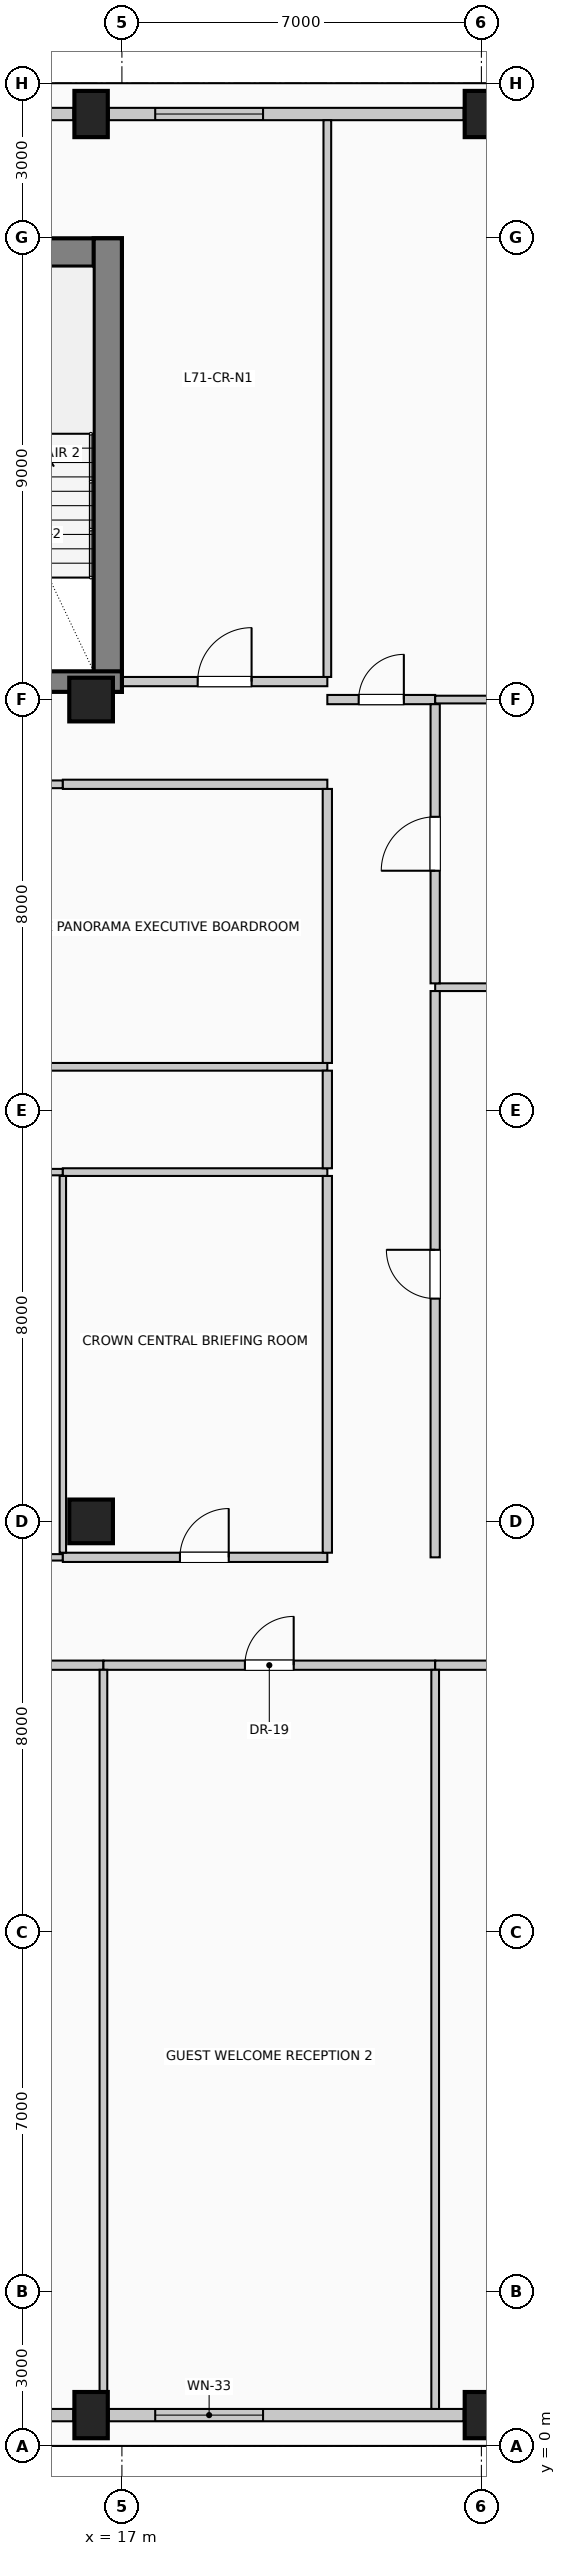
"""IFC4 building model, lengths in metres.
Left out: names, types, materials, properties, quantities, classifications, styles, units other than length and angle.
Written with IfcOpenShell. Run it as: python <this file> out.ifc"""

import sys

from ifc_helpers import new_model, si_unit, direction, frame, frame_2d, origin, origin_2d, place, context, subcontext, project, spatial, rectangle, circle, extrude, element, fill, save


model = new_model("IFC4")
c1 = context("Model", 3, precision=1e-05, world=origin(), true_north=direction((0.0, 1.0)))
c2 = subcontext(c1, "Body", "Model", "MODEL_VIEW")
j1 = project(units=[si_unit("LENGTHUNIT", "METRE"), si_unit("PLANEANGLEUNIT", "RADIAN")], contexts=[c1])
p1 = place(None, origin())
s1 = spatial("IfcSite", under=j1, at=p1, CompositionType="ELEMENT")
p2 = place(p1, origin())
s2 = spatial("IfcBuilding", under=s1, at=p2, CompositionType="ELEMENT")
p3 = place(p2, frame((0.0, 0.0, 293.0)))
s3 = spatial("IfcBuildingStorey", under=s2, at=p3, CompositionType="ELEMENT", Elevation=293.0)
p4 = place(p3, frame((3.0, 42.705, 0.0), z_axis=(0.0, 0.0, 1.0), x_axis=(1.0, 0.0, 0.0)))
e1 = element("IfcWall", 1, at=p4, inside=s3, PredefinedType="SHEAR", context=c2, shape_type="SweptSolid", body=[
    extrude(rectangle(XDim=14.0, YDim=0.55, at=frame_2d((7.0, 0.0))), origin(), (0.0, 0.0, 1.0), 4.0),
])
p5 = place(p3, frame((16.725, 34.15, 0.0), z_axis=(0.0, 0.0, 1.0), x_axis=(0.0, 1.0, 0.0)))
e2 = element("IfcWall", 2, at=p5, inside=s3, PredefinedType="SHEAR", context=c2, shape_type="SweptSolid", body=[
    extrude(rectangle(XDim=8.83, YDim=0.55, at=frame_2d((4.415, 0.0))), origin(), (0.0, 0.0, 1.0), 4.0),
])
p6 = place(p3, frame((12.29, 34.35, 0.0), z_axis=(0.0, 0.0, 1.0), x_axis=(1.0, 0.0, 0.0)))
e3 = element("IfcWall", 3, at=p6, inside=s3, PredefinedType="SHEAR", context=c2, shape_type="SweptSolid", body=[
    extrude(rectangle(XDim=4.71, YDim=0.4, at=frame_2d((2.355, 0.0))), origin(), (0.0, 0.0, 1.0), 4.0),
])
p7 = place(p6, frame((1.4, 0.0, 0.0)))
e4 = element("IfcOpeningElement", 4, at=p7, cuts=e3, PredefinedType="OPENING", context=c2, shape_type="SweptSolid", body=[
    extrude(rectangle(XDim=1.15, YDim=2.2, at=frame_2d((0.575, 1.1))), frame((0.0, 0.21, 0.0), z_axis=(0.0, -1.0, 0.0), x_axis=(1.0, 0.0, 0.0)), (0.0, 0.0, 1.0), 0.42),
])
for number, where, z_axis, x_axis in (
    (5, (16.4, 0.6, 0.0), (0.0, 0.0, 1.0), (1.0, 0.0, 0.0)),
    (6, (16.4, 45.4, 0.0), (0.0, 0.0, 1.0), (1.0, 0.0, 0.0)),
    (7, (24.0, 0.6, 0.0), (0.0, 0.0, 1.0), (1.0, 0.0, 0.0)),
    (8, (24.0, 45.4, 0.0), (0.0, 0.0, 1.0), (1.0, 0.0, 0.0)),
):
    element("IfcColumn", number, at=place(p3, frame(where, z_axis=z_axis, x_axis=x_axis)), inside=s3, PredefinedType="COLUMN", context=c2, shape_type="SweptSolid", body=[
        extrude(rectangle(XDim=0.65, YDim=0.9, at=origin_2d()), origin(), (0.0, 0.0, 1.0), 4.0),
    ])
for number, where, z_axis, x_axis in (
    (9, (16.4, 18.0, 0.0), (0.0, 0.0, 1.0), (1.0, 0.0, 0.0)),
    (10, (16.4, 34.0, 0.0), (0.0, 0.0, 1.0), (1.0, 0.0, 0.0)),
):
    element("IfcColumn", number, at=place(p3, frame(where, z_axis=z_axis, x_axis=x_axis)), inside=s3, PredefinedType="COLUMN", context=c2, shape_type="SweptSolid", body=[
        extrude(circle(Radius=0.425, at=origin_2d()), origin(), (0.0, 0.0, 1.0), 4.0),
    ])
p8 = place(p3, frame((16.055, 0.6, 0.0), z_axis=(0.0, 0.0, 1.0), x_axis=(-1.0, 0.0, 0.0)))
e11 = element("IfcWall", 11, at=p8, inside=s3, PredefinedType="SOLIDWALL", context=c2, shape_type="SweptSolid", body=[
    extrude(rectangle(XDim=1.71, YDim=0.24, at=frame_2d((0.855, 0.0))), origin(), (0.0, 0.0, 1.0), 3.025),
])
p9 = place(p3, frame((23.655, 0.6, 0.0), z_axis=(0.0, 0.0, 1.0), x_axis=(-1.0, 0.0, 0.0)))
e12 = element("IfcWall", 12, at=p9, inside=s3, PredefinedType="SOLIDWALL", context=c2, shape_type="SweptSolid", body=[
    extrude(rectangle(XDim=6.91, YDim=0.24, at=frame_2d((3.455, 0.0))), origin(), (0.0, 0.0, 1.0), 3.025),
])
p10 = place(p9, frame((3.907, 0.0, 0.35)))
e13 = element("IfcOpeningElement", 13, at=p10, cuts=e12, PredefinedType="OPENING", context=c2, shape_type="SweptSolid", body=[
    extrude(rectangle(XDim=2.1, YDim=2.2, at=frame_2d((1.05, 1.1))), frame((0.0, 0.13, 0.0), z_axis=(0.0, -1.0, 0.0), x_axis=(1.0, 0.0, 0.0)), (0.0, 0.0, 1.0), 0.26),
])
p11 = place(p3, frame((14.345, 45.4, 0.0), z_axis=(0.0, 0.0, 1.0), x_axis=(1.0, 0.0, 0.0)))
e14 = element("IfcWall", 14, at=p11, inside=s3, PredefinedType="SOLIDWALL", context=c2, shape_type="SweptSolid", body=[
    extrude(rectangle(XDim=1.71, YDim=0.24, at=frame_2d((0.855, 0.0))), origin(), (0.0, 0.0, 1.0), 3.025),
])
p12 = place(p3, frame((16.745, 45.4, 0.0), z_axis=(0.0, 0.0, 1.0), x_axis=(1.0, 0.0, 0.0)))
e15 = element("IfcWall", 15, at=p12, inside=s3, PredefinedType="SOLIDWALL", context=c2, shape_type="SweptSolid", body=[
    extrude(rectangle(XDim=6.91, YDim=0.24, at=frame_2d((3.455, 0.0))), origin(), (0.0, 0.0, 1.0), 3.025),
])
p13 = place(p12, frame((0.903, 0.0, 0.35)))
e16 = element("IfcOpeningElement", 16, at=p13, cuts=e15, PredefinedType="OPENING", context=c2, shape_type="SweptSolid", body=[
    extrude(rectangle(XDim=2.1, YDim=2.2, at=frame_2d((1.05, 1.1))), frame((0.0, 0.13, 0.0), z_axis=(0.0, -1.0, 0.0), x_axis=(1.0, 0.0, 0.0)), (0.0, 0.0, 1.0), 0.26),
])
p14 = place(p3, frame((8.84, 15.2, 0.0), z_axis=(0.0, 0.0, 1.0), x_axis=(1.0, 0.0, 0.0)))
e17 = element("IfcWall", 17, at=p14, inside=s3, PredefinedType="PARTITIONING", context=c2, shape_type="SweptSolid", body=[
    extrude(rectangle(XDim=7.8, YDim=0.18, at=frame_2d((3.9, 0.0))), origin(), (0.0, 0.0, 1.0), 3.775),
])
p15 = place(p14, frame((3.375, 0.0, 0.0)))
e18 = element("IfcOpeningElement", 18, at=p15, cuts=e17, PredefinedType="OPENING", context=c2, shape_type="SweptSolid", body=[
    extrude(rectangle(XDim=1.05, YDim=2.15, at=frame_2d((0.525, 1.075))), frame((0.0, 0.1, 0.0), z_axis=(0.0, -1.0, 0.0), x_axis=(1.0, 0.0, 0.0)), (0.0, 0.0, 1.0), 0.2),
])
p16 = place(p3, frame((16.64, 15.2, 0.0), z_axis=(0.0, 0.0, 1.0), x_axis=(1.0, 0.0, 0.0)))
e19 = element("IfcWall", 19, at=p16, inside=s3, PredefinedType="PARTITIONING", context=c2, shape_type="SweptSolid", body=[
    extrude(rectangle(XDim=6.46, YDim=0.18, at=frame_2d((3.23, 0.0))), origin(), (0.0, 0.0, 1.0), 3.775),
])
p17 = place(p16, frame((2.755, 0.0, 0.0)))
e20 = element("IfcOpeningElement", 20, at=p17, cuts=e19, PredefinedType="OPENING", context=c2, shape_type="SweptSolid", body=[
    extrude(rectangle(XDim=0.95, YDim=2.15, at=frame_2d((0.475, 1.075))), frame((0.0, 0.1, 0.0), z_axis=(0.0, -1.0, 0.0), x_axis=(1.0, 0.0, 0.0)), (0.0, 0.0, 1.0), 0.2),
])
p18 = place(p3, frame((23.1, 15.2, 0.0), z_axis=(0.0, 0.0, 1.0), x_axis=(1.0, 0.0, 0.0)))
e21 = element("IfcWall", 21, at=p18, inside=s3, PredefinedType="PARTITIONING", context=c2, shape_type="SweptSolid", body=[
    extrude(rectangle(XDim=10.14, YDim=0.18, at=frame_2d((5.07, 0.0))), origin(), (0.0, 0.0, 1.0), 3.775),
])
p19 = place(p18, frame((4.545, 0.0, 0.0)))
e22 = element("IfcOpeningElement", 22, at=p19, cuts=e21, PredefinedType="OPENING", context=c2, shape_type="SweptSolid", body=[
    extrude(rectangle(XDim=1.05, YDim=2.15, at=frame_2d((0.525, 1.075))), frame((0.0, 0.1, 0.0), z_axis=(0.0, -1.0, 0.0), x_axis=(1.0, 0.0, 0.0)), (0.0, 0.0, 1.0), 0.2),
])
p20 = place(p3, frame((9.8, 17.3, 0.0), z_axis=(0.0, 0.0, 1.0), x_axis=(1.0, 0.0, 0.0)))
e23 = element("IfcWall", 23, at=p20, inside=s3, PredefinedType="PARTITIONING", context=c2, shape_type="SweptSolid", body=[
    extrude(rectangle(XDim=6.05, YDim=0.125, at=frame_2d((3.025, 0.0))), origin(), (0.0, 0.0, 1.0), 3.775),
])
p21 = place(p20, frame((2.575, 0.0, 0.0)))
e24 = element("IfcOpeningElement", 24, at=p21, cuts=e23, PredefinedType="OPENING", context=c2, shape_type="SweptSolid", body=[
    extrude(rectangle(XDim=0.9, YDim=2.1, at=frame_2d((0.45, 1.05))), frame((0.0, 0.073, 0.0), z_axis=(0.0, -1.0, 0.0), x_axis=(1.0, 0.0, 0.0)), (0.0, 0.0, 1.0), 0.145),
])
p22 = place(p3, frame((15.85, 17.3, 0.0), z_axis=(0.0, 0.0, 1.0), x_axis=(1.0, 0.0, 0.0)))
e25 = element("IfcWall", 25, at=p22, inside=s3, PredefinedType="PARTITIONING", context=c2, shape_type="SweptSolid", body=[
    extrude(rectangle(XDim=5.15, YDim=0.18, at=frame_2d((2.575, 0.0))), origin(), (0.0, 0.0, 1.0), 3.775),
])
p23 = place(p22, frame((2.28, 0.0, 0.0)))
e26 = element("IfcOpeningElement", 26, at=p23, cuts=e25, PredefinedType="OPENING", context=c2, shape_type="SweptSolid", body=[
    extrude(rectangle(XDim=0.95, YDim=2.15, at=frame_2d((0.475, 1.075))), frame((0.0, 0.1, 0.0), z_axis=(0.0, -1.0, 0.0), x_axis=(1.0, 0.0, 0.0)), (0.0, 0.0, 1.0), 0.2),
])
p24 = place(p3, frame((12.2, 24.8, 0.0), z_axis=(0.0, 0.0, 1.0), x_axis=(1.0, 0.0, 0.0)))
e27 = element("IfcWall", 27, at=p24, inside=s3, PredefinedType="PARTITIONING", context=c2, shape_type="SweptSolid", body=[
    extrude(rectangle(XDim=3.65, YDim=0.125, at=frame_2d((1.825, 0.0))), origin(), (0.0, 0.0, 1.0), 3.775),
])
p25 = place(p3, frame((15.85, 24.8, 0.0), z_axis=(0.0, 0.0, 1.0), x_axis=(1.0, 0.0, 0.0)))
e28 = element("IfcWall", 28, at=p25, inside=s3, PredefinedType="PARTITIONING", context=c2, shape_type="SweptSolid", body=[
    extrude(rectangle(XDim=5.15, YDim=0.15, at=frame_2d((2.575, 0.0))), origin(), (0.0, 0.0, 1.0), 3.775),
])
p26 = place(p3, frame((12.2, 26.85, 0.0), z_axis=(0.0, 0.0, 1.0), x_axis=(1.0, 0.0, 0.0)))
e29 = element("IfcWall", 29, at=p26, inside=s3, PredefinedType="PARTITIONING", context=c2, shape_type="SweptSolid", body=[
    extrude(rectangle(XDim=8.8, YDim=0.15, at=frame_2d((4.4, 0.0))), origin(), (0.0, 0.0, 1.0), 3.775),
])
p27 = place(p3, frame((23.1, 28.4, 0.0), z_axis=(0.0, 0.0, 1.0), x_axis=(1.0, 0.0, 0.0)))
e30 = element("IfcWall", 30, at=p27, inside=s3, PredefinedType="PARTITIONING", context=c2, shape_type="SweptSolid", body=[
    extrude(rectangle(XDim=20.78, YDim=0.15, at=frame_2d((10.39, 0.0))), origin(), (0.0, 0.0, 1.0), 3.775),
])
p28 = place(p3, frame((12.33, 32.35, 0.0), z_axis=(0.0, 0.0, 1.0), x_axis=(1.0, 0.0, 0.0)))
e31 = element("IfcWall", 31, at=p28, inside=s3, PredefinedType="PARTITIONING", context=c2, shape_type="SweptSolid", body=[
    extrude(rectangle(XDim=3.52, YDim=0.15, at=frame_2d((1.76, 0.0))), origin(), (0.0, 0.0, 1.0), 3.775),
])
p29 = place(p28, frame((1.235, 0.0, 0.0)))
e32 = element("IfcOpeningElement", 32, at=p29, cuts=e31, PredefinedType="OPENING", context=c2, shape_type="SweptSolid", body=[
    extrude(rectangle(XDim=1.05, YDim=2.15, at=frame_2d((0.525, 1.075))), frame((0.0, 0.085, 0.0), z_axis=(0.0, -1.0, 0.0), x_axis=(1.0, 0.0, 0.0)), (0.0, 0.0, 1.0), 0.17),
])
p30 = place(p3, frame((15.85, 32.35, 0.0), z_axis=(0.0, 0.0, 1.0), x_axis=(1.0, 0.0, 0.0)))
e33 = element("IfcWall", 33, at=p30, inside=s3, PredefinedType="PARTITIONING", context=c2, shape_type="SweptSolid", body=[
    extrude(rectangle(XDim=5.15, YDim=0.18, at=frame_2d((2.575, 0.0))), origin(), (0.0, 0.0, 1.0), 3.775),
])
p31 = place(p3, frame((21.0, 34.0, 0.0), z_axis=(0.0, 0.0, 1.0), x_axis=(1.0, 0.0, 0.0)))
e34 = element("IfcWall", 34, at=p31, inside=s3, PredefinedType="PARTITIONING", context=c2, shape_type="SweptSolid", body=[
    extrude(rectangle(XDim=2.1, YDim=0.18, at=frame_2d((1.05, 0.0))), origin(), (0.0, 0.0, 1.0), 3.27),
])
p32 = place(p31, frame((0.61, 0.0, 0.0)))
e35 = element("IfcOpeningElement", 35, at=p32, cuts=e34, PredefinedType="OPENING", context=c2, shape_type="SweptSolid", body=[
    extrude(rectangle(XDim=0.88, YDim=2.1, at=frame_2d((0.44, 1.05))), frame((0.0, 0.1, 0.0), z_axis=(0.0, -1.0, 0.0), x_axis=(1.0, 0.0, 0.0)), (0.0, 0.0, 1.0), 0.2),
])
p33 = place(p3, frame((23.1, 34.0, 0.0), z_axis=(0.0, 0.0, 1.0), x_axis=(1.0, 0.0, 0.0)))
e36 = element("IfcWall", 36, at=p33, inside=s3, PredefinedType="PARTITIONING", context=c2, shape_type="SweptSolid", body=[
    extrude(rectangle(XDim=5.475, YDim=0.15, at=frame_2d((2.737, 0.0))), origin(), (0.0, 0.0, 1.0), 3.27),
])
p34 = place(p3, frame((17.0, 34.35, 0.0), z_axis=(0.0, 0.0, 1.0), x_axis=(1.0, 0.0, 0.0)))
e37 = element("IfcWall", 37, at=p34, inside=s3, PredefinedType="PARTITIONING", context=c2, shape_type="SweptSolid", body=[
    extrude(rectangle(XDim=4.0, YDim=0.18, at=frame_2d((2.0, 0.0))), origin(), (0.0, 0.0, 1.0), 3.775),
])
p35 = place(p34, frame((1.475, 0.0, 0.0)))
e38 = element("IfcOpeningElement", 38, at=p35, cuts=e37, PredefinedType="OPENING", context=c2, shape_type="SweptSolid", body=[
    extrude(rectangle(XDim=1.05, YDim=2.15, at=frame_2d((0.525, 1.075))), frame((0.0, 0.1, 0.0), z_axis=(0.0, -1.0, 0.0), x_axis=(1.0, 0.0, 0.0)), (0.0, 0.0, 1.0), 0.2),
])
p36 = place(p3, frame((15.85, 17.39, 0.0), z_axis=(0.0, 0.0, 1.0), x_axis=(0.0, 1.0, 0.0)))
e39 = element("IfcWall", 39, at=p36, inside=s3, PredefinedType="PARTITIONING", context=c2, shape_type="SweptSolid", body=[
    extrude(rectangle(XDim=7.335, YDim=0.125, at=frame_2d((3.667, 0.0))), origin(), (0.0, 0.0, 1.0), 3.775),
])
p37 = place(p3, frame((16.64, 1.05, 0.0), z_axis=(0.0, 0.0, 1.0), x_axis=(0.0, 1.0, 0.0)))
e40 = element("IfcWall", 40, at=p37, inside=s3, PredefinedType="PARTITIONING", context=c2, shape_type="SweptSolid", body=[
    extrude(rectangle(XDim=14.06, YDim=0.15, at=frame_2d((7.03, 0.0))), origin(), (0.0, 0.0, 1.0), 3.27),
])
p38 = place(p3, frame((21.0, 17.39, 0.0), z_axis=(0.0, 0.0, 1.0), x_axis=(0.0, 1.0, 0.0)))
e41 = element("IfcWall", 41, at=p38, inside=s3, PredefinedType="PARTITIONING", context=c2, shape_type="SweptSolid", body=[
    extrude(rectangle(XDim=7.335, YDim=0.18, at=frame_2d((3.667, 0.0))), origin(), (0.0, 0.0, 1.0), 3.775),
])
p39 = place(p3, frame((21.0, 24.875, 0.0), z_axis=(0.0, 0.0, 1.0), x_axis=(0.0, 1.0, 0.0)))
e42 = element("IfcWall", 42, at=p39, inside=s3, PredefinedType="PARTITIONING", context=c2, shape_type="SweptSolid", body=[
    extrude(rectangle(XDim=1.9, YDim=0.18, at=frame_2d((0.95, 0.0))), origin(), (0.0, 0.0, 1.0), 3.775),
])
p40 = place(p3, frame((21.0, 26.925, 0.0), z_axis=(0.0, 0.0, 1.0), x_axis=(0.0, 1.0, 0.0)))
e43 = element("IfcWall", 43, at=p40, inside=s3, PredefinedType="PARTITIONING", context=c2, shape_type="SweptSolid", body=[
    extrude(rectangle(XDim=5.335, YDim=0.18, at=frame_2d((2.667, 0.0))), origin(), (0.0, 0.0, 1.0), 3.775),
])
p41 = place(p3, frame((21.0, 34.44, 0.0), z_axis=(0.0, 0.0, 1.0), x_axis=(0.0, 1.0, 0.0)))
e44 = element("IfcWall", 44, at=p41, inside=s3, PredefinedType="PARTITIONING", context=c2, shape_type="SweptSolid", body=[
    extrude(rectangle(XDim=10.84, YDim=0.15, at=frame_2d((5.42, 0.0))), origin(), (0.0, 0.0, 1.0), 3.775),
])
p42 = place(p3, frame((23.1, 0.72, 0.0), z_axis=(0.0, 0.0, 1.0), x_axis=(0.0, 1.0, 0.0)))
e45 = element("IfcWall", 45, at=p42, inside=s3, PredefinedType="PARTITIONING", context=c2, shape_type="SweptSolid", body=[
    extrude(rectangle(XDim=14.39, YDim=0.15, at=frame_2d((7.195, 0.0))), origin(), (0.0, 0.0, 1.0), 3.775),
])
p43 = place(p3, frame((23.1, 17.3, 0.0), z_axis=(0.0, 0.0, 1.0), x_axis=(0.0, 1.0, 0.0)))
e46 = element("IfcWall", 46, at=p43, inside=s3, PredefinedType="PARTITIONING", context=c2, shape_type="SweptSolid", body=[
    extrude(rectangle(XDim=11.025, YDim=0.18, at=frame_2d((5.512, 0.0))), origin(), (0.0, 0.0, 1.0), 3.775),
])
p44 = place(p43, frame((5.038, 0.0, 0.0)))
e47 = element("IfcOpeningElement", 47, at=p44, cuts=e46, PredefinedType="OPENING", context=c2, shape_type="SweptSolid", body=[
    extrude(rectangle(XDim=0.95, YDim=2.15, at=frame_2d((0.475, 1.075))), frame((0.0, 0.1, 0.0), z_axis=(0.0, -1.0, 0.0), x_axis=(1.0, 0.0, 0.0)), (0.0, 0.0, 1.0), 0.2),
])
p45 = place(p3, frame((23.1, 28.475, 0.0), z_axis=(0.0, 0.0, 1.0), x_axis=(0.0, 1.0, 0.0)))
e48 = element("IfcWall", 48, at=p45, inside=s3, PredefinedType="PARTITIONING", context=c2, shape_type="SweptSolid", body=[
    extrude(rectangle(XDim=5.435, YDim=0.18, at=frame_2d((2.717, 0.0))), origin(), (0.0, 0.0, 1.0), 3.775),
])
p46 = place(p45, frame((2.192, 0.0, 0.0)))
e49 = element("IfcOpeningElement", 49, at=p46, cuts=e48, PredefinedType="OPENING", context=c2, shape_type="SweptSolid", body=[
    extrude(rectangle(XDim=1.05, YDim=2.15, at=frame_2d((0.525, 1.075))), frame((0.0, 0.1, 0.0), z_axis=(0.0, -1.0, 0.0), x_axis=(1.0, 0.0, 0.0)), (0.0, 0.0, 1.0), 0.2),
])
p47 = place(p10, origin())
e50 = element("IfcWindow", 50, at=p47, inside=s3, PartitioningType="SINGLE_PANEL", PredefinedType="WINDOW", context=c2, shape_type="SweptSolid", body=[
    extrude(rectangle(XDim=2.1, YDim=2.2, at=frame_2d((1.05, 1.1))), frame((0.0, 0.03, 0.0), z_axis=(0.0, -1.0, 0.0), x_axis=(1.0, 0.0, 0.0)), (0.0, 0.0, 1.0), 0.06),
])
fill(e13, e50)
p48 = place(p13, origin())
e51 = element("IfcWindow", 51, at=p48, inside=s3, PartitioningType="SINGLE_PANEL", PredefinedType="WINDOW", context=c2, shape_type="SweptSolid", body=[
    extrude(rectangle(XDim=2.1, YDim=2.2, at=frame_2d((1.05, 1.1))), frame((0.0, 0.03, 0.0), z_axis=(0.0, -1.0, 0.0), x_axis=(1.0, 0.0, 0.0)), (0.0, 0.0, 1.0), 0.06),
])
fill(e16, e51)
p49 = place(p17, origin())
e52 = element("IfcDoor", 52, at=p49, inside=s3, OperationType="SINGLE_SWING_RIGHT", PredefinedType="DOOR", context=c2, shape_type="SweptSolid", body=[
    extrude(rectangle(XDim=0.95, YDim=2.15, at=frame_2d((0.475, 1.075))), frame((0.0, 0.025, 0.0), z_axis=(0.0, -1.0, 0.0), x_axis=(1.0, 0.0, 0.0)), (0.0, 0.0, 1.0), 0.05),
])
fill(e20, e52)
p50 = place(p23, origin())
e53 = element("IfcDoor", 53, at=p50, inside=s3, OperationType="SINGLE_SWING_RIGHT", PredefinedType="DOOR", context=c2, shape_type="SweptSolid", body=[
    extrude(rectangle(XDim=0.95, YDim=2.15, at=frame_2d((0.475, 1.075))), frame((0.0, 0.025, 0.0), z_axis=(0.0, -1.0, 0.0), x_axis=(1.0, 0.0, 0.0)), (0.0, 0.0, 1.0), 0.05),
])
fill(e26, e53)
p51 = place(p32, origin())
e54 = element("IfcDoor", 54, at=p51, inside=s3, OperationType="SINGLE_SWING_RIGHT", PredefinedType="DOOR", context=c2, shape_type="SweptSolid", body=[
    extrude(rectangle(XDim=0.88, YDim=2.1, at=frame_2d((0.44, 1.05))), frame((0.0, 0.025, 0.0), z_axis=(0.0, -1.0, 0.0), x_axis=(1.0, 0.0, 0.0)), (0.0, 0.0, 1.0), 0.05),
])
fill(e35, e54)
p52 = place(p35, origin())
e55 = element("IfcDoor", 55, at=p52, inside=s3, OperationType="SINGLE_SWING_RIGHT", PredefinedType="DOOR", context=c2, shape_type="SweptSolid", body=[
    extrude(rectangle(XDim=1.05, YDim=2.15, at=frame_2d((0.525, 1.075))), frame((0.0, 0.025, 0.0), z_axis=(0.0, -1.0, 0.0), x_axis=(1.0, 0.0, 0.0)), (0.0, 0.0, 1.0), 0.05),
])
fill(e38, e55)
p53 = place(p44, origin())
e56 = element("IfcDoor", 56, at=p53, inside=s3, OperationType="SINGLE_SWING_RIGHT", PredefinedType="DOOR", context=c2, shape_type="SweptSolid", body=[
    extrude(rectangle(XDim=0.95, YDim=2.15, at=frame_2d((0.475, 1.075))), frame((0.0, 0.025, 0.0), z_axis=(0.0, -1.0, 0.0), x_axis=(1.0, 0.0, 0.0)), (0.0, 0.0, 1.0), 0.05),
])
fill(e47, e56)
p54 = place(p46, origin())
e57 = element("IfcDoor", 57, at=p54, inside=s3, OperationType="SINGLE_SWING_LEFT", PredefinedType="DOOR", context=c2, shape_type="SweptSolid", body=[
    extrude(rectangle(XDim=1.05, YDim=2.15, at=frame_2d((0.525, 1.075))), frame((0.0, 0.025, 0.0), z_axis=(0.0, -1.0, 0.0), x_axis=(1.0, 0.0, 0.0)), (0.0, 0.0, 1.0), 0.05),
])
fill(e49, e57)
save(model, sys.argv[1])
